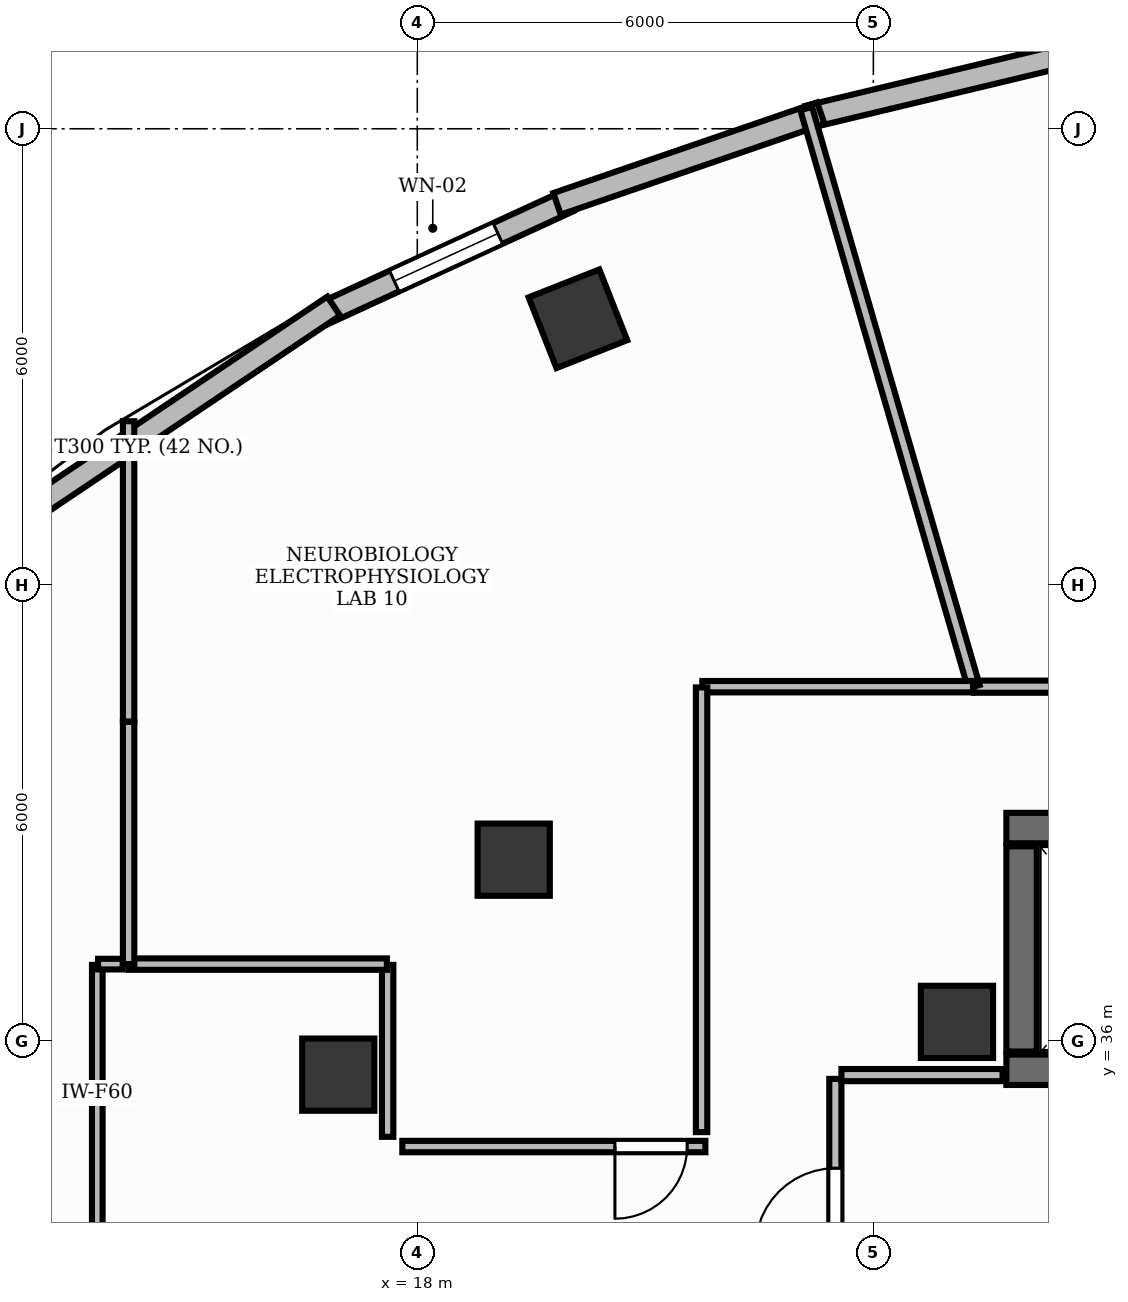
"""IFC4 building model, lengths in metres.
Left out: names, types, materials, properties, quantities, classifications, styles, units other than length and angle.
Written with IfcOpenShell. Run it as: python <this file> out.ifc"""

import sys

from ifc_helpers import new_model, si_unit, direction, frame, frame_2d, origin, origin_2d, place, context, subcontext, project, spatial, rectangle, extrude, element, fill, save


model = new_model("IFC4")
c1 = context("Model", 3, precision=1e-05, world=origin(), true_north=direction((0.0, 1.0)))
c2 = subcontext(c1, "Body", "Model", "MODEL_VIEW")
j1 = project(units=[si_unit("LENGTHUNIT", "METRE"), si_unit("PLANEANGLEUNIT", "RADIAN")], contexts=[c1])
p1 = place(None, origin())
s1 = spatial("IfcSite", under=j1, at=p1, CompositionType="ELEMENT")
p2 = place(p1, origin())
s2 = spatial("IfcBuilding", under=s1, at=p2, CompositionType="ELEMENT")
p3 = place(p2, frame((0.0, 0.0, 235.2)))
s3 = spatial("IfcBuildingStorey", under=s2, at=p3, CompositionType="ELEMENT", Elevation=235.2)
p4 = place(p3, frame((25.75, 38.8, 0.0), z_axis=(0.0, 0.0, 1.0), x_axis=(1.0, 0.0, 0.0)))
e1 = element("IfcWall", 1, at=p4, inside=s3, PredefinedType="SHEAR", context=c2, shape_type="SweptSolid", body=[
    extrude(rectangle(XDim=3.1, YDim=0.4, at=frame_2d((1.55, 0.0))), origin(), (0.0, 0.0, 1.0), 3.9),
])
p5 = place(p3, frame((25.75, 35.62, 0.0), z_axis=(0.0, 0.0, 1.0), x_axis=(1.0, 0.0, 0.0)))
e2 = element("IfcWall", 2, at=p5, inside=s3, PredefinedType="SHEAR", context=c2, shape_type="SweptSolid", body=[
    extrude(rectangle(XDim=3.1, YDim=0.4, at=frame_2d((1.55, 0.0))), origin(), (0.0, 0.0, 1.0), 3.9),
])
p6 = place(p5, frame((0.9, 0.0, 0.0)))
e3 = element("IfcOpeningElement", 3, at=p6, cuts=e2, PredefinedType="OPENING", context=c2, shape_type="SweptSolid", body=[
    extrude(rectangle(XDim=1.3, YDim=2.2, at=frame_2d((0.65, 1.1))), frame((0.0, 0.215, 0.0), z_axis=(0.0, -1.0, 0.0), x_axis=(1.0, 0.0, 0.0)), (0.0, 0.0, 1.0), 0.43),
])
p7 = place(p3, frame((25.95, 35.86, 0.0), z_axis=(0.0, 0.0, 1.0), x_axis=(0.0, 1.0, 0.0)))
e4 = element("IfcWall", 4, at=p7, inside=s3, PredefinedType="SHEAR", context=c2, shape_type="SweptSolid", body=[
    extrude(rectangle(XDim=2.7, YDim=0.4, at=frame_2d((1.35, 0.0))), origin(), (0.0, 0.0, 1.0), 3.9),
])
p8 = place(p3, frame((25.1, 36.25, -0.0), z_axis=(0.0, 0.0, 1.0), x_axis=(1.0, 0.0, 0.0)))
e5 = element("IfcColumn", 5, at=p8, inside=s3, PredefinedType="PILASTER", context=c2, shape_type="SweptSolid", body=[
    extrude(rectangle(XDim=0.95, YDim=0.95, at=origin_2d()), origin(), (0.0, 0.0, 1.0), 3.901),
])
p9 = place(p3, frame((20.113, 45.5, -0.0), z_axis=(0.0, 0.0, 1.0), x_axis=(0.930225540858, 0.366988341962, 0.0)))
e6 = element("IfcColumn", 6, at=p9, inside=s3, PredefinedType="COLUMN", context=c2, shape_type="SweptSolid", body=[
    extrude(rectangle(XDim=1.0, YDim=1.0, at=origin_2d()), origin(), (0.0, 0.0, 1.0), 3.901),
])
for number, where, z_axis, x_axis in (
    (7, (19.268, 38.384, -0.0), (0.0, 0.0, 1.0), (1.0, 0.0, 0.0)),
    (8, (16.96, 35.556, -0.0), (0.0, 0.0, 1.0), (1.0, 0.0, 0.0)),
):
    element("IfcColumn", number, at=place(p3, frame(where, z_axis=z_axis, x_axis=x_axis)), inside=s3, PredefinedType="COLUMN", context=c2, shape_type="SweptSolid", body=[
        extrude(rectangle(XDim=0.95, YDim=0.95, at=origin_2d()), origin(), (0.0, 0.0, 1.0), 3.901),
    ])
p10 = place(p3, frame((19.99, 47.051, 0.0), z_axis=(0.0, 0.0, 1.0), x_axis=(-0.908478431596, -0.41793174003, 0.0)))
e9 = element("IfcWall", 9, at=p10, inside=s3, PredefinedType="STANDARD", context=c2, shape_type="SweptSolid", body=[
    extrude(rectangle(XDim=3.547, YDim=0.3, at=frame_2d((1.773, 0.0))), origin(), (0.0, 0.0, 1.0), 3.9),
])
p11 = place(p10, frame((1.023, 0.0, 0.95)))
e10 = element("IfcOpeningElement", 10, at=p11, cuts=e9, PredefinedType="OPENING", context=c2, shape_type="SweptSolid", body=[
    extrude(rectangle(XDim=1.5, YDim=1.8, at=frame_2d((0.75, 0.9))), frame((0.0, 0.165, 0.0), z_axis=(0.0, -1.0, 0.0), x_axis=(1.0, 0.0, 0.0)), (0.0, 0.0, 1.0), 0.33),
])
p12 = place(p3, frame((26.775, 49.027, 0.0), z_axis=(0.0, 0.0, 1.0), x_axis=(-0.972475629939, -0.233004611918, 0.0)))
e11 = element("IfcWall", 11, at=p12, inside=s3, PredefinedType="STANDARD", context=c2, shape_type="SweptSolid", body=[
    extrude(rectangle(XDim=3.735, YDim=0.3, at=frame_2d((1.868, 0.0))), origin(), (0.0, 0.0, 1.0), 3.9),
])
p13 = place(p3, frame((23.309, 48.205, 0.0), z_axis=(0.0, 0.0, 1.0), x_axis=(-0.945722383555, -0.32497565023, 0.0)))
e12 = element("IfcWall", 12, at=p13, inside=s3, PredefinedType="STANDARD", context=c2, shape_type="SweptSolid", body=[
    extrude(rectangle(XDim=3.67, YDim=0.3, at=frame_2d((1.835, 0.0))), origin(), (0.0, 0.0, 1.0), 3.47),
])
p14 = place(p3, frame((16.9, 45.667, 0.0), z_axis=(0.0, 0.0, 1.0), x_axis=(-0.829994558021, -0.557771488743, 0.0)))
e13 = element("IfcWall", 13, at=p14, inside=s3, PredefinedType="STANDARD", context=c2, shape_type="SweptSolid", body=[
    extrude(rectangle(XDim=6.706, YDim=0.3, at=frame_2d((3.353, 0.0))), origin(), (0.0, 0.0, 1.0), 3.9),
])
p15 = place(p3, frame((23.5, 32.1, 0.0), z_axis=(0.0, 0.0, 1.0), x_axis=(0.0, 1.0, 0.0)))
e14 = element("IfcWall", 14, at=p15, inside=s3, PredefinedType="PARTITIONING", context=c2, shape_type="SweptSolid", body=[
    extrude(rectangle(XDim=3.4, YDim=0.16, at=frame_2d((1.7, 0.0))), origin(), (0.0, 0.0, 1.0), 2.91),
])
p16 = place(p15, frame((1.175, 0.0, 0.0)))
e15 = element("IfcOpeningElement", 15, at=p16, cuts=e14, PredefinedType="OPENING", context=c2, shape_type="SweptSolid", body=[
    extrude(rectangle(XDim=1.05, YDim=2.15, at=frame_2d((0.525, 1.075))), frame((0.0, 0.095, 0.0), z_axis=(0.0, -1.0, 0.0), x_axis=(1.0, 0.0, 0.0)), (0.0, 0.0, 1.0), 0.19),
])
p17 = place(p3, frame((23.58, 35.55, 0.0), z_axis=(0.0, 0.0, 1.0), x_axis=(1.0, 0.0, 0.0)))
e16 = element("IfcWall", 16, at=p17, inside=s3, PredefinedType="PARTITIONING", context=c2, shape_type="SweptSolid", body=[
    extrude(rectangle(XDim=2.12, YDim=0.16, at=frame_2d((1.06, 0.0))), origin(), (0.0, 0.0, 1.0), 2.91),
])
p18 = place(p3, frame((35.592, 40.66, 0.0), z_axis=(0.0, 0.0, 1.0), x_axis=(-1.0, 0.0, 0.0)))
e17 = element("IfcWall", 17, at=p18, inside=s3, PredefinedType="PARTITIONING", context=c2, shape_type="SweptSolid", body=[
    extrude(rectangle(XDim=10.271, YDim=0.16, at=frame_2d((5.135, 0.0))), origin(), (0.0, 0.0, 1.0), 2.91),
])
p19 = place(p18, frame((2.146, 0.0, 0.0)))
e18 = element("IfcOpeningElement", 18, at=p19, cuts=e17, PredefinedType="OPENING", context=c2, shape_type="SweptSolid", body=[
    extrude(rectangle(XDim=0.95, YDim=2.15, at=frame_2d((0.475, 1.075))), frame((0.0, 0.095, 0.0), z_axis=(0.0, -1.0, 0.0), x_axis=(1.0, 0.0, 0.0)), (0.0, 0.0, 1.0), 0.19),
])
p20 = place(p3, frame((21.79, 34.61, 0.0), z_axis=(0.0, 0.0, 1.0), x_axis=(-1.0, 0.0, 0.0)))
e19 = element("IfcWall", 19, at=p20, inside=s3, PredefinedType="PARTITIONING", context=c2, shape_type="SweptSolid", body=[
    extrude(rectangle(XDim=3.987, YDim=0.15, at=frame_2d((1.994, 0.0))), origin(), (0.0, 0.0, 1.0), 2.91),
])
p21 = place(p20, frame((0.24, 0.0, 0.0)))
e20 = element("IfcOpeningElement", 20, at=p21, cuts=e19, PredefinedType="OPENING", context=c2, shape_type="SweptSolid", body=[
    extrude(rectangle(XDim=0.95, YDim=2.15, at=frame_2d((0.475, 1.075))), frame((0.0, 0.09, 0.0), z_axis=(0.0, -1.0, 0.0), x_axis=(1.0, 0.0, 0.0)), (0.0, 0.0, 1.0), 0.18),
])
p22 = place(p3, frame((13.79, 37.0, 0.0), z_axis=(0.0, 0.0, 1.0), x_axis=(0.0, -1.0, 0.0)))
e21 = element("IfcWall", 21, at=p22, inside=s3, PredefinedType="PARTITIONING", context=c2, shape_type="SweptSolid", body=[
    extrude(rectangle(XDim=4.79, YDim=0.14, at=frame_2d((2.395, 0.0))), origin(), (0.0, 0.0, 1.0), 2.91),
])
p23 = place(p22, frame((3.6, 0.0, 0.0)))
e22 = element("IfcOpeningElement", 22, at=p23, cuts=e21, PredefinedType="OPENING", context=c2, shape_type="SweptSolid", body=[
    extrude(rectangle(XDim=0.95, YDim=2.15, at=frame_2d((0.475, 1.075))), frame((0.0, 0.085, 0.0), z_axis=(0.0, -1.0, 0.0), x_axis=(1.0, 0.0, 0.0)), (0.0, 0.0, 1.0), 0.17),
])
p24 = place(p3, frame((25.322, 40.66, 0.0), z_axis=(0.0, 0.0, 1.0), x_axis=(-0.278465296123, 0.960446291499, 0.0)))
e23 = element("IfcWall", 23, at=p24, inside=s3, PredefinedType="PARTITIONING", context=c2, shape_type="SweptSolid", body=[
    extrude(rectangle(XDim=7.919, YDim=0.16, at=frame_2d((3.959, 0.0))), origin(), (0.0, 0.0, 1.0), 2.91),
])
p25 = place(p3, frame((25.311, 40.66, 0.0), z_axis=(0.0, 0.0, 1.0), x_axis=(-1.0, 0.0, 0.0)))
e24 = element("IfcWall", 24, at=p25, inside=s3, PredefinedType="PARTITIONING", context=c2, shape_type="SweptSolid", body=[
    extrude(rectangle(XDim=3.561, YDim=0.15, at=frame_2d((1.781, 0.0))), origin(), (0.0, 0.0, 1.0), 2.91),
])
p26 = place(p3, frame((21.74, 40.65, 0.0), z_axis=(0.0, 0.0, 1.0), x_axis=(0.0, -1.0, 0.0)))
e25 = element("IfcWall", 25, at=p26, inside=s3, PredefinedType="PARTITIONING", context=c2, shape_type="SweptSolid", body=[
    extrude(rectangle(XDim=5.85, YDim=0.15, at=frame_2d((2.925, 0.0))), origin(), (0.0, 0.0, 1.0), 2.91),
])
p27 = place(p3, frame((17.61, 34.738, 0.0), z_axis=(0.0, 0.0, 1.0), x_axis=(0.0, 1.0, 0.0)))
e26 = element("IfcWall", 26, at=p27, inside=s3, PredefinedType="PARTITIONING", context=c2, shape_type="SweptSolid", body=[
    extrude(rectangle(XDim=2.262, YDim=0.15, at=frame_2d((1.131, 0.0))), origin(), (0.0, 0.0, 1.0), 2.91),
])
p28 = place(p3, frame((17.6, 37.01, 0.0), z_axis=(0.0, 0.0, 1.0), x_axis=(-1.0, 0.0, 0.0)))
e27 = element("IfcWall", 27, at=p28, inside=s3, PredefinedType="PARTITIONING", context=c2, shape_type="SweptSolid", body=[
    extrude(rectangle(XDim=3.398, YDim=0.15, at=frame_2d((1.699, 0.0))), origin(), (0.0, 0.0, 1.0), 2.91),
])
p29 = place(p3, frame((14.202, 37.01, 0.0), z_axis=(0.0, 0.0, 1.0), x_axis=(0.0, 1.0, 0.0)))
e28 = element("IfcWall", 28, at=p29, inside=s3, PredefinedType="PARTITIONING", context=c2, shape_type="SweptSolid", body=[
    extrude(rectangle(XDim=3.188, YDim=0.15, at=frame_2d((1.594, 0.0))), origin(), (0.0, 0.0, 1.0), 2.91),
])
p30 = place(p3, frame((14.202, 40.202, 0.0), z_axis=(0.0, 0.0, 1.0), x_axis=(0.0, 1.0, 0.0)))
e29 = element("IfcWall", 29, at=p30, inside=s3, PredefinedType="PARTITIONING", context=c2, shape_type="SweptSolid", body=[
    extrude(rectangle(XDim=3.95, YDim=0.15, at=frame_2d((1.975, 0.0))), origin(), (0.0, 0.0, 1.0), 2.91),
])
p31 = place(p3, frame((14.124, 37.01, 0.0), z_axis=(0.0, 0.0, 1.0), x_axis=(-1.0, 0.0, 0.0)))
e30 = element("IfcWall", 30, at=p31, inside=s3, PredefinedType="PARTITIONING", context=c2, shape_type="SweptSolid", body=[
    extrude(rectangle(XDim=0.324, YDim=0.14, at=frame_2d((0.162, 0.0))), origin(), (0.0, 0.0, 1.0), 2.91),
])
p32 = place(p11, origin())
e31 = element("IfcWindow", 31, at=p32, inside=s3, PartitioningType="DOUBLE_PANEL_VERTICAL", PredefinedType="WINDOW", context=c2, shape_type="SweptSolid", body=[
    extrude(rectangle(XDim=1.5, YDim=1.8, at=frame_2d((0.75, 0.9))), frame((0.0, 0.03, 0.0), z_axis=(0.0, -1.0, 0.0), x_axis=(1.0, 0.0, 0.0)), (0.0, 0.0, 1.0), 0.06),
])
fill(e10, e31)
p33 = place(p16, origin())
e32 = element("IfcDoor", 32, at=p33, inside=s3, OperationType="SINGLE_SWING_LEFT", PredefinedType="DOOR", context=c2, shape_type="SweptSolid", body=[
    extrude(rectangle(XDim=1.05, YDim=2.15, at=frame_2d((0.525, 1.075))), frame((0.0, 0.025, 0.0), z_axis=(0.0, -1.0, 0.0), x_axis=(1.0, 0.0, 0.0)), (0.0, 0.0, 1.0), 0.05),
])
fill(e15, e32)
p34 = place(p21, origin())
e33 = element("IfcDoor", 33, at=p34, inside=s3, OperationType="SINGLE_SWING_RIGHT", PredefinedType="DOOR", context=c2, shape_type="SweptSolid", body=[
    extrude(rectangle(XDim=0.95, YDim=2.15, at=frame_2d((0.475, 1.075))), frame((0.0, 0.025, 0.0), z_axis=(0.0, -1.0, 0.0), x_axis=(1.0, 0.0, 0.0)), (0.0, 0.0, 1.0), 0.05),
])
fill(e20, e33)
save(model, sys.argv[1])
